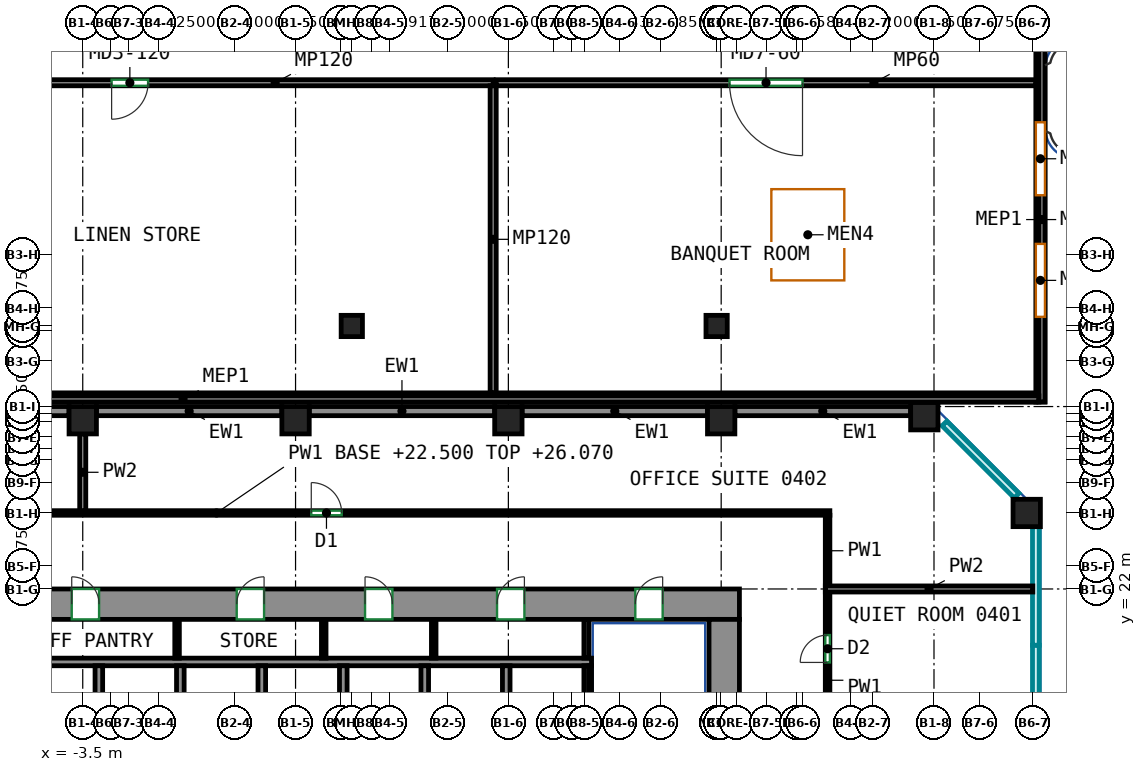
"""IFC4 building model, lengths in metres.
Left out: names, types, materials, properties, quantities, classifications, styles, units other than length and angle.
Written with IfcOpenShell. Run it as: python <this file> out.ifc"""

import sys

from ifc_helpers import new_model, si_unit, direction, frame, frame_2d, origin, origin_2d, place, context, subcontext, project, spatial, rectangle, extrude, source, transform, mapped, element, fill, save


model = new_model("IFC4")
c1 = context("Model", 3, precision=1e-05, world=origin(), true_north=direction((0.0, 1.0)))
c2 = subcontext(c1, "Body", "Model", "MODEL_VIEW")
j1 = project(units=[si_unit("LENGTHUNIT", "METRE"), si_unit("PLANEANGLEUNIT", "RADIAN")], contexts=[c1])
p1 = place(None, origin())
s1 = spatial("IfcSite", under=j1, at=p1, CompositionType="ELEMENT")
p2 = place(p1, origin())
s2 = spatial("IfcBuilding", under=s1, at=p2, CompositionType="ELEMENT")
p3 = place(p2, frame((0.0, 0.0, 22.5)))
s3 = spatial("IfcBuildingStorey", under=s2, at=p3, CompositionType="ELEMENT", Elevation=22.5)
m1 = source(origin(), c2, "Body", "SweptSolid", [
    extrude(rectangle(XDim=0.9, YDim=0.9, at=origin_2d()), origin(), (0.0, 0.0, 1.0), 4.22),
])
for number, where, z_axis, x_axis in (
    (1, (-3.5, 27.55, 0.0), (0.0, 0.0, 1.0), (1.0, 0.0, 0.0)),
    (2, (3.5, 27.55, 0.0), (0.0, 0.0, 1.0), (1.0, 0.0, 0.0)),
    (3, (10.5, 27.55, 0.0), (0.0, 0.0, 1.0), (1.0, 0.0, 0.0)),
    (4, (17.5, 27.55, 0.0), (0.0, 0.0, 1.0), (1.0, 0.0, 0.0)),
    (5, (24.182, 27.682, 0.0), (0.0, 0.0, 1.0), (1.0, 0.0, 0.0)),
    (6, (27.55, 24.5, 0.0), (0.0, 0.0, 1.0), (1.0, 0.0, 0.0)),
):
    element("IfcColumn", number, at=place(p3, frame(where, z_axis=z_axis, x_axis=x_axis)), inside=s3, PredefinedType="COLUMN", context=c2, shape_type="MappedRepresentation", body=[
        mapped(m1, transform((0.0, 0.0, 0.0))),
    ])
m2 = source(origin(), c2, "Body", "SweptSolid", [
    extrude(rectangle(XDim=34.1, YDim=1.0, at=frame_2d((17.05, 0.0))), origin(), (0.0, 0.0, 1.0), 4.22),
])
p4 = place(p3, frame((-16.0, 21.5, 0.0), z_axis=(0.0, 0.0, 1.0), x_axis=(1.0, 0.0, 0.0)))
e7 = element("IfcWall", 7, at=p4, inside=s3, PredefinedType="SHEAR", context=c2, shape_type="MappedRepresentation", body=[
    mapped(m2, transform((0.0, 0.0, 0.0))),
])
p5 = place(p4, frame((6.831, 0.0, 0.0)))
e8 = element("IfcOpeningElement", 8, at=p5, cuts=e7, PredefinedType="OPENING", context=c2, shape_type="SweptSolid", body=[
    extrude(rectangle(XDim=0.9, YDim=2.1, at=frame_2d((0.45, 1.05))), frame((0.0, 0.51, 0.0), z_axis=(0.0, -1.0, 0.0), x_axis=(1.0, 0.0, 0.0)), (0.0, 0.0, 1.0), 1.02),
])
p6 = place(p4, frame((12.138, 0.0, 0.0)))
e9 = element("IfcOpeningElement", 9, at=p6, cuts=e7, PredefinedType="OPENING", context=c2, shape_type="SweptSolid", body=[
    extrude(rectangle(XDim=0.9, YDim=2.1, at=frame_2d((0.45, 1.05))), frame((0.0, 0.51, 0.0), z_axis=(0.0, -1.0, 0.0), x_axis=(1.0, 0.0, 0.0)), (0.0, 0.0, 1.0), 1.02),
])
p7 = place(p4, frame((17.565, 0.0, 0.0)))
e10 = element("IfcOpeningElement", 10, at=p7, cuts=e7, PredefinedType="OPENING", context=c2, shape_type="SweptSolid", body=[
    extrude(rectangle(XDim=0.9, YDim=2.1, at=frame_2d((0.45, 1.05))), frame((0.0, 0.51, 0.0), z_axis=(0.0, -1.0, 0.0), x_axis=(1.0, 0.0, 0.0)), (0.0, 0.0, 1.0), 1.02),
])
p8 = place(p4, frame((21.786, 0.0, 0.0)))
e11 = element("IfcOpeningElement", 11, at=p8, cuts=e7, PredefinedType="OPENING", context=c2, shape_type="SweptSolid", body=[
    extrude(rectangle(XDim=0.9, YDim=2.1, at=frame_2d((0.45, 1.05))), frame((0.0, 0.51, 0.0), z_axis=(0.0, -1.0, 0.0), x_axis=(1.0, 0.0, 0.0)), (0.0, 0.0, 1.0), 1.02),
])
p9 = place(p4, frame((26.127, 0.0, 0.0)))
e12 = element("IfcOpeningElement", 12, at=p9, cuts=e7, PredefinedType="OPENING", context=c2, shape_type="SweptSolid", body=[
    extrude(rectangle(XDim=0.9, YDim=2.1, at=frame_2d((0.45, 1.05))), frame((0.0, 0.51, 0.0), z_axis=(0.0, -1.0, 0.0), x_axis=(1.0, 0.0, 0.0)), (0.0, 0.0, 1.0), 1.02),
])
p10 = place(p4, frame((2.525, 0.0, 0.0)))
e13 = element("IfcOpeningElement", 13, at=p10, cuts=e7, PredefinedType="OPENING", context=c2, shape_type="SweptSolid", body=[
    extrude(rectangle(XDim=0.9, YDim=2.1, at=frame_2d((0.45, 1.05))), frame((0.0, 0.51, 0.0), z_axis=(0.0, -1.0, 0.0), x_axis=(1.0, 0.0, 0.0)), (0.0, 0.0, 1.0), 1.02),
])
p11 = place(p4, frame((30.675, 0.0, 0.0)))
e14 = element("IfcOpeningElement", 14, at=p11, cuts=e7, PredefinedType="OPENING", context=c2, shape_type="SweptSolid", body=[
    extrude(rectangle(XDim=0.9, YDim=2.1, at=frame_2d((0.45, 1.05))), frame((0.0, 0.51, 0.0), z_axis=(0.0, -1.0, 0.0), x_axis=(1.0, 0.0, 0.0)), (0.0, 0.0, 1.0), 1.02),
])
m3 = source(origin(), c2, "Body", "SweptSolid", [
    extrude(rectangle(XDim=12.0, YDim=1.0, at=frame_2d((6.0, 0.0))), origin(), (0.0, 0.0, 1.0), 4.22),
])
p12 = place(p3, frame((17.6, 9.0, 0.0), z_axis=(0.0, 0.0, 1.0), x_axis=(0.0, 1.0, 0.0)))
e15 = element("IfcWall", 15, at=p12, inside=s3, PredefinedType="SHEAR", context=c2, shape_type="MappedRepresentation", body=[
    mapped(m3, transform((0.0, 0.0, 0.0))),
])
m4 = source(origin(), c2, "Body", "SweptSolid", [
    extrude(rectangle(XDim=0.7, YDim=0.7, at=origin_2d()), origin(), (0.0, 0.0, 1.0), 4.22),
])
for number, where, z_axis, x_axis in (
    (16, (5.35, 30.65, 0.0), (0.0, 0.0, 1.0), (1.0, 0.0, 0.0)),
    (17, (17.35, 30.65, 0.0), (0.0, 0.0, 1.0), (1.0, 0.0, 0.0)),
):
    element("IfcColumn", number, at=place(p3, frame(where, z_axis=z_axis, x_axis=x_axis)), inside=s3, PredefinedType="COLUMN", context=c2, shape_type="MappedRepresentation", body=[
        mapped(m4, transform((0.0, 0.0, 0.0))),
    ])
m5 = source(origin(), c2, "Body", "SweptSolid", [
    extrude(rectangle(XDim=5.782, YDim=0.3, at=frame_2d((2.891, 0.0))), origin(), (0.0, 0.0, 1.0), 4.22),
])
p13 = place(p3, frame((23.732, 27.85, 0.0), z_axis=(0.0, 0.0, 1.0), x_axis=(-1.0, 0.0, 0.0)))
e18 = element("IfcWall", 18, at=p13, inside=s3, PredefinedType="SOLIDWALL", context=c2, shape_type="MappedRepresentation", body=[
    mapped(m5, transform((0.0, 0.0, 0.0))),
])
m6 = source(origin(), c2, "Body", "SweptSolid", [
    extrude(rectangle(XDim=6.1, YDim=0.3, at=frame_2d((3.05, 0.0))), origin(), (0.0, 0.0, 1.0), 4.22),
])
for number, where, z_axis, x_axis in (
    (19, (17.05, 27.85, 0.0), (0.0, 0.0, 1.0), (-1.0, 0.0, 0.0)),
    (20, (10.05, 27.85, 0.0), (0.0, 0.0, 1.0), (-1.0, 0.0, 0.0)),
    (21, (3.05, 27.85, 0.0), (0.0, 0.0, 1.0), (-1.0, 0.0, 0.0)),
    (22, (-3.95, 27.85, 0.0), (0.0, 0.0, 1.0), (-1.0, 0.0, 0.0)),
):
    element("IfcWall", number, at=place(p3, frame(where, z_axis=z_axis, x_axis=x_axis)), inside=s3, PredefinedType="SOLIDWALL", context=c2, shape_type="MappedRepresentation", body=[
        mapped(m6, transform((0.0, 0.0, 0.0))),
    ])
m7 = source(origin(), c2, "Body", "SweptSolid", [
    extrude(rectangle(XDim=12.0, YDim=0.3, at=frame_2d((6.0, 0.0))), origin(), (0.0, 0.0, 1.0), 4.22),
])
p14 = place(p3, frame((28.0, 40.15, 0.0), z_axis=(0.0, 0.0, 1.0), x_axis=(0.0, -1.0, 0.0)))
e23 = element("IfcWall", 23, at=p14, inside=s3, PredefinedType="SOLIDWALL", context=c2, shape_type="MappedRepresentation", body=[
    mapped(m7, transform((0.0, 0.0, 0.0))),
])
p15 = place(p14, frame((2.8, 0.0, 0.9)))
e24 = element("IfcOpeningElement", 24, at=p15, cuts=e23, PredefinedType="OPENING", context=c2, shape_type="SweptSolid", body=[
    extrude(rectangle(XDim=2.4, YDim=1.8, at=frame_2d((1.2, 0.9))), frame((0.0, 0.16, 0.0), z_axis=(0.0, -1.0, 0.0), x_axis=(1.0, 0.0, 0.0)), (0.0, 0.0, 1.0), 0.32),
])
p16 = place(p14, frame((6.8, 0.0, 0.9)))
e25 = element("IfcOpeningElement", 25, at=p16, cuts=e23, PredefinedType="OPENING", context=c2, shape_type="SweptSolid", body=[
    extrude(rectangle(XDim=2.4, YDim=1.8, at=frame_2d((1.2, 0.9))), frame((0.0, 0.16, 0.0), z_axis=(0.0, -1.0, 0.0), x_axis=(1.0, 0.0, 0.0)), (0.0, 0.0, 1.0), 0.32),
])
m8 = source(origin(), c2, "Body", "SweptSolid", [
    extrude(rectangle(XDim=56.3, YDim=0.3, at=frame_2d((28.15, 0.0))), origin(), (0.0, 0.0, 1.0), 4.22),
])
p17 = place(p3, frame((27.85, 28.3, 0.0), z_axis=(0.0, 0.0, 1.0), x_axis=(-1.0, 0.0, 0.0)))
e26 = element("IfcWall", 26, at=p17, inside=s3, PredefinedType="SOLIDWALL", context=c2, shape_type="MappedRepresentation", body=[
    mapped(m8, transform((0.0, 0.0, 0.0))),
])
m9 = source(origin(), c2, "Body", "SweptSolid", [
    extrude(rectangle(XDim=12.0, YDim=0.2, at=frame_2d((6.0, 0.0))), origin(), (0.0, 0.0, 1.0), 1.1),
])
p18 = place(p3, frame((28.05, 40.15, 4.5), z_axis=(0.0, 0.0, 1.0), x_axis=(0.0, -1.0, 0.0)))
e27 = element("IfcWall", 27, at=p18, inside=s3, PredefinedType="PARAPET", context=c2, shape_type="MappedRepresentation", body=[
    mapped(m9, transform((0.0, 0.0, 0.0))),
])
m10 = source(origin(), c2, "Body", "SweptSolid", [
    extrude(rectangle(XDim=56.3, YDim=0.2, at=frame_2d((28.15, 0.0))), origin(), (0.0, 0.0, 1.0), 1.1),
])
p19 = place(p3, frame((27.95, 28.25, 4.5), z_axis=(0.0, 0.0, 1.0), x_axis=(-1.0, 0.0, 0.0)))
e28 = element("IfcWall", 28, at=p19, inside=s3, PredefinedType="PARAPET", context=c2, shape_type="MappedRepresentation", body=[
    mapped(m10, transform((0.0, 0.0, 0.0))),
])
m11 = source(origin(), c2, "Body", "SweptSolid", [
    extrude(rectangle(XDim=24.37, YDim=0.25, at=frame_2d((12.185, 0.0))), origin(), (0.0, 0.0, 1.0), 4.22),
])
p20 = place(p3, frame((-11.135, 19.6, 0.0), z_axis=(0.0, 0.0, 1.0), x_axis=(1.0, 0.0, 0.0)))
e29 = element("IfcWall", 29, at=p20, inside=s3, PredefinedType="PARTITIONING", context=c2, shape_type="MappedRepresentation", body=[
    mapped(m11, transform((0.0, 0.0, 0.0))),
])
m12 = source(origin(), c2, "Body", "SweptSolid", [
    extrude(rectangle(XDim=3.275, YDim=0.165, at=frame_2d((1.638, 0.0))), origin(), (0.0, 0.0, 1.0), 4.22),
])
p21 = place(p3, frame((13.067, 16.2, 0.0), z_axis=(0.0, 0.0, 1.0), x_axis=(0.0, 1.0, 0.0)))
e30 = element("IfcWall", 30, at=p21, inside=s3, PredefinedType="PARTITIONING", context=c2, shape_type="MappedRepresentation", body=[
    mapped(m12, transform((0.0, 0.0, 0.0))),
])
m13 = source(origin(), c2, "Body", "SweptSolid", [
    extrude(rectangle(XDim=1.275, YDim=0.165, at=frame_2d((0.637, 0.0))), origin(), (0.0, 0.0, 1.0), 4.22),
])
p22 = place(p3, frame((13.067, 19.725, 0.0), z_axis=(0.0, 0.0, 1.0), x_axis=(0.0, 1.0, 0.0)))
e31 = element("IfcWall", 31, at=p22, inside=s3, PredefinedType="PARTITIONING", context=c2, shape_type="MappedRepresentation", body=[
    mapped(m13, transform((0.0, 0.0, 0.0))),
])
m14 = source(origin(), c2, "Body", "SweptSolid", [
    extrude(rectangle(XDim=3.275, YDim=0.25, at=frame_2d((1.638, 0.0))), origin(), (0.0, 0.0, 1.0), 4.22),
])
p23 = place(p3, frame((10.43, 16.2, 0.0), z_axis=(0.0, 0.0, 1.0), x_axis=(0.0, 1.0, 0.0)))
e32 = element("IfcWall", 32, at=p23, inside=s3, PredefinedType="PARTITIONING", context=c2, shape_type="MappedRepresentation", body=[
    mapped(m14, transform((0.0, 0.0, 0.0))),
])
m15 = source(origin(), c2, "Body", "SweptSolid", [
    extrude(rectangle(XDim=2.725, YDim=0.085, at=frame_2d((1.363, 0.0))), origin(), (0.0, 0.0, 1.0), 4.22),
])
p24 = place(p3, frame((13.192, 16.75, 0.0), z_axis=(0.0, 0.0, 1.0), x_axis=(0.0, 1.0, 0.0)))
e33 = element("IfcWall", 33, at=p24, inside=s3, PredefinedType="PARTITIONING", context=c2, shape_type="MappedRepresentation", body=[
    mapped(m15, transform((0.0, 0.0, 0.0))),
])
for number, where, z_axis, x_axis in (
    (34, (2.39, 16.2, 0.0), (0.0, 0.0, 1.0), (0.0, 1.0, 0.0)),
    (35, (5.07, 16.2, 0.0), (0.0, 0.0, 1.0), (0.0, 1.0, 0.0)),
    (36, (7.75, 16.2, 0.0), (0.0, 0.0, 1.0), (0.0, 1.0, 0.0)),
    (37, (-0.29, 16.2, 0.0), (0.0, 0.0, 1.0), (0.0, 1.0, 0.0)),
    (38, (-2.97, 16.2, 0.0), (0.0, 0.0, 1.0), (0.0, 1.0, 0.0)),
):
    element("IfcWall", number, at=place(p3, frame(where, z_axis=z_axis, x_axis=x_axis)), inside=s3, PredefinedType="PARTITIONING", context=c2, shape_type="MappedRepresentation", body=[
        mapped(m14, transform((0.0, 0.0, 0.0))),
    ])
m16 = source(origin(), c2, "Body", "SweptSolid", [
    extrude(rectangle(XDim=1.275, YDim=0.15, at=frame_2d((0.637, 0.0))), origin(), (0.0, 0.0, 1.0), 4.22),
])
for number, where, z_axis, x_axis in (
    (39, (-0.397, 19.725, 0.0), (0.0, 0.0, 1.0), (0.0, 1.0, 0.0)),
    (40, (4.427, 19.725, 0.0), (0.0, 0.0, 1.0), (0.0, 1.0, 0.0)),
    (41, (8.045, 19.725, 0.0), (0.0, 0.0, 1.0), (0.0, 1.0, 0.0)),
):
    element("IfcWall", number, at=place(p3, frame(where, z_axis=z_axis, x_axis=x_axis)), inside=s3, PredefinedType="PARTITIONING", context=c2, shape_type="MappedRepresentation", body=[
        mapped(m16, transform((0.0, 0.0, 0.0))),
    ])
p25 = place(p3, frame((21.0, 17.75, 0.0), z_axis=(0.0, 0.0, 1.0), x_axis=(0.0, 1.0, 0.0)))
e42 = element("IfcWall", 42, at=p25, inside=s3, PredefinedType="PARTITIONING", context=c2, shape_type="SweptSolid", body=[
    extrude(rectangle(XDim=4.16, YDim=0.15, at=frame_2d((2.08, 0.0))), origin(), (0.0, 0.0, 1.0), 4.22),
])
p26 = place(p25, frame((1.834, 0.0, 0.0)))
e43 = element("IfcOpeningElement", 43, at=p26, cuts=e42, PredefinedType="OPENING", context=c2, shape_type="SweptSolid", body=[
    extrude(rectangle(XDim=0.9, YDim=2.1, at=frame_2d((0.45, 1.05))), frame((0.0, 0.085, 0.0), z_axis=(0.0, -1.0, 0.0), x_axis=(1.0, 0.0, 0.0)), (0.0, 0.0, 1.0), 0.17),
])
p27 = place(p3, frame((21.0, 22.09, 0.0), z_axis=(0.0, 0.0, 1.0), x_axis=(0.0, 1.0, 0.0)))
e44 = element("IfcWall", 44, at=p27, inside=s3, PredefinedType="PARTITIONING", context=c2, shape_type="SweptSolid", body=[
    extrude(rectangle(XDim=2.335, YDim=0.15, at=frame_2d((1.167, 0.0))), origin(), (0.0, 0.0, 1.0), 4.22),
])
p28 = place(p3, frame((-19.275, 24.5, 0.0), z_axis=(0.0, 0.0, 1.0), x_axis=(1.0, 0.0, 0.0)))
e45 = element("IfcWall", 45, at=p28, inside=s3, PredefinedType="PARTITIONING", context=c2, shape_type="SweptSolid", body=[
    extrude(rectangle(XDim=40.35, YDim=0.15, at=frame_2d((20.175, 0.0))), origin(), (0.0, 0.0, 1.0), 3.57),
])
p29 = place(p28, frame((10.378, 0.0, 0.0)))
e46 = element("IfcOpeningElement", 46, at=p29, cuts=e45, PredefinedType="OPENING", context=c2, shape_type="SweptSolid", body=[
    extrude(rectangle(XDim=0.9, YDim=2.1, at=frame_2d((0.45, 1.05))), frame((0.0, 0.085, 0.0), z_axis=(0.0, -1.0, 0.0), x_axis=(1.0, 0.0, 0.0)), (0.0, 0.0, 1.0), 0.17),
])
p30 = place(p28, frame((23.292, 0.0, 0.0)))
e47 = element("IfcOpeningElement", 47, at=p30, cuts=e45, PredefinedType="OPENING", context=c2, shape_type="SweptSolid", body=[
    extrude(rectangle(XDim=1.0, YDim=2.1, at=frame_2d((0.5, 1.05))), frame((0.0, 0.085, 0.0), z_axis=(0.0, -1.0, 0.0), x_axis=(1.0, 0.0, 0.0)), (0.0, 0.0, 1.0), 0.17),
])
p31 = place(p3, frame((20.926, 22.0, 0.0), z_axis=(0.0, 0.0, 1.0), x_axis=(1.0, 0.0, 0.0)))
e48 = element("IfcWall", 48, at=p31, inside=s3, PredefinedType="PARTITIONING", context=c2, shape_type="SweptSolid", body=[
    extrude(rectangle(XDim=6.824, YDim=0.2, at=frame_2d((3.412, 0.0))), origin(), (0.0, 0.0, 1.0), 4.22),
])
p32 = place(p3, frame((-3.5, 27.1, 0.0), z_axis=(0.0, 0.0, 1.0), x_axis=(0.0, -1.0, 0.0)))
e49 = element("IfcWall", 49, at=p32, inside=s3, PredefinedType="PARTITIONING", context=c2, shape_type="SweptSolid", body=[
    extrude(rectangle(XDim=2.524, YDim=0.2, at=frame_2d((1.262, 0.0))), origin(), (0.0, 0.0, 1.0), 4.22),
])
m17 = source(origin(), c2, "Body", "SweptSolid", [
    extrude(rectangle(XDim=23.9, YDim=0.2, at=frame_2d((11.95, 0.0))), origin(), (0.0, 0.0, 1.0), 3.42),
])
p33 = place(p3, frame((10.0, 38.65, 0.0), z_axis=(0.0, 0.0, 1.0), x_axis=(-1.0, 0.0, 0.0)))
e50 = element("IfcWall", 50, at=p33, inside=s3, PredefinedType="PARTITIONING", context=c2, shape_type="MappedRepresentation", body=[
    mapped(m17, transform((0.0, 0.0, 0.0))),
])
p34 = place(p33, frame((11.35, 0.0, 0.0)))
e51 = element("IfcOpeningElement", 51, at=p34, cuts=e50, PredefinedType="OPENING", context=c2, shape_type="SweptSolid", body=[
    extrude(rectangle(XDim=1.2, YDim=2.1, at=frame_2d((0.6, 1.05))), frame((0.0, 0.11, 0.0), z_axis=(0.0, -1.0, 0.0), x_axis=(1.0, 0.0, 0.0)), (0.0, 0.0, 1.0), 0.22),
])
m18 = source(origin(), c2, "Body", "SweptSolid", [
    extrude(rectangle(XDim=10.1, YDim=0.2, at=frame_2d((5.05, 0.0))), origin(), (0.0, 0.0, 1.0), 3.42),
])
p35 = place(p3, frame((10.0, 38.55, 0.0), z_axis=(0.0, 0.0, 1.0), x_axis=(0.0, -1.0, 0.0)))
e52 = element("IfcWall", 52, at=p35, inside=s3, PredefinedType="PARTITIONING", context=c2, shape_type="MappedRepresentation", body=[
    mapped(m18, transform((0.0, 0.0, 0.0))),
])
m19 = source(origin(), c2, "Body", "SweptSolid", [
    extrude(rectangle(XDim=17.75, YDim=0.2, at=frame_2d((8.875, 0.0))), origin(), (0.0, 0.0, 1.0), 3.42),
])
p36 = place(p3, frame((27.85, 38.65, 0.0), z_axis=(0.0, 0.0, 1.0), x_axis=(-1.0, 0.0, 0.0)))
e53 = element("IfcWall", 53, at=p36, inside=s3, PredefinedType="PARTITIONING", context=c2, shape_type="MappedRepresentation", body=[
    mapped(m19, transform((0.0, 0.0, 0.0))),
])
p37 = place(p36, frame((7.675, 0.0, 0.0)))
e54 = element("IfcOpeningElement", 54, at=p37, cuts=e53, PredefinedType="OPENING", context=c2, shape_type="SweptSolid", body=[
    extrude(rectangle(XDim=2.4, YDim=2.4, at=frame_2d((1.2, 1.2))), frame((0.0, 0.11, 0.0), z_axis=(0.0, -1.0, 0.0), x_axis=(1.0, 0.0, 0.0)), (0.0, 0.0, 1.0), 0.22),
])
p38 = place(p15, origin())
e55 = element("IfcWindow", 55, at=p38, inside=s3, PartitioningType="SINGLE_PANEL", PredefinedType="WINDOW", context=c2, shape_type="SweptSolid", body=[
    extrude(rectangle(XDim=2.4, YDim=1.8, at=frame_2d((1.2, 0.9))), frame((0.0, 0.03, 0.0), z_axis=(0.0, -1.0, 0.0), x_axis=(1.0, 0.0, 0.0)), (0.0, 0.0, 1.0), 0.06),
])
fill(e24, e55)
p39 = place(p16, origin())
e56 = element("IfcWindow", 56, at=p39, inside=s3, PartitioningType="SINGLE_PANEL", PredefinedType="WINDOW", context=c2, shape_type="SweptSolid", body=[
    extrude(rectangle(XDim=2.4, YDim=1.8, at=frame_2d((1.2, 0.9))), frame((0.0, 0.03, 0.0), z_axis=(0.0, -1.0, 0.0), x_axis=(1.0, 0.0, 0.0)), (0.0, 0.0, 1.0), 0.06),
])
fill(e25, e56)
p40 = place(p2, frame((0.0, 0.0, 27.0)))
p41 = place(p40, frame((0.0, 0.0, -0.28)))
p42 = place(p41, frame((20.35, 33.65, 0.0)))
p43 = place(p42, frame((0.0, 0.0, 0.23)))
e57 = element("IfcWindow", 57, at=p43, inside=s3, PartitioningType="SINGLE_PANEL", PredefinedType="SKYLIGHT", context=c2, shape_type="SweptSolid", body=[
    extrude(rectangle(XDim=2.4, YDim=3.0, at=origin_2d()), origin(), (0.0, 0.0, 1.0), 0.05),
])
p44 = place(p6, origin())
e58 = element("IfcDoor", 58, at=p44, inside=s3, OperationType="SINGLE_SWING_LEFT", PredefinedType="DOOR", context=c2, shape_type="SweptSolid", body=[
    extrude(rectangle(XDim=0.9, YDim=2.1, at=frame_2d((0.45, 1.05))), frame((0.0, -0.355, 0.0), z_axis=(0.0, -1.0, 0.0), x_axis=(1.0, 0.0, 0.0)), (0.0, 0.0, 1.0), 0.05),
])
fill(e9, e58)
p45 = place(p7, origin())
e59 = element("IfcDoor", 59, at=p45, inside=s3, OperationType="SINGLE_SWING_RIGHT", PredefinedType="DOOR", context=c2, shape_type="SweptSolid", body=[
    extrude(rectangle(XDim=0.9, YDim=2.1, at=frame_2d((0.45, 1.05))), frame((0.0, -0.355, 0.0), z_axis=(0.0, -1.0, 0.0), x_axis=(1.0, 0.0, 0.0)), (0.0, 0.0, 1.0), 0.05),
])
fill(e10, e59)
p46 = place(p8, origin())
e60 = element("IfcDoor", 60, at=p46, inside=s3, OperationType="SINGLE_SWING_LEFT", PredefinedType="DOOR", context=c2, shape_type="SweptSolid", body=[
    extrude(rectangle(XDim=0.9, YDim=2.1, at=frame_2d((0.45, 1.05))), frame((0.0, -0.355, 0.0), z_axis=(0.0, -1.0, 0.0), x_axis=(1.0, 0.0, 0.0)), (0.0, 0.0, 1.0), 0.05),
])
fill(e11, e60)
p47 = place(p9, origin())
e61 = element("IfcDoor", 61, at=p47, inside=s3, OperationType="SINGLE_SWING_RIGHT", PredefinedType="DOOR", context=c2, shape_type="SweptSolid", body=[
    extrude(rectangle(XDim=0.9, YDim=2.1, at=frame_2d((0.45, 1.05))), frame((0.0, -0.355, 0.0), z_axis=(0.0, -1.0, 0.0), x_axis=(1.0, 0.0, 0.0)), (0.0, 0.0, 1.0), 0.05),
])
fill(e12, e61)
p48 = place(p11, origin())
e62 = element("IfcDoor", 62, at=p48, inside=s3, OperationType="SINGLE_SWING_RIGHT", PredefinedType="DOOR", context=c2, shape_type="SweptSolid", body=[
    extrude(rectangle(XDim=0.9, YDim=2.1, at=frame_2d((0.45, 1.05))), frame((0.0, -0.355, 0.0), z_axis=(0.0, -1.0, 0.0), x_axis=(1.0, 0.0, 0.0)), (0.0, 0.0, 1.0), 0.05),
])
fill(e14, e62)
p49 = place(p26, origin())
e63 = element("IfcDoor", 63, at=p49, inside=s3, OperationType="SINGLE_SWING_LEFT", PredefinedType="DOOR", context=c2, shape_type="SweptSolid", body=[
    extrude(rectangle(XDim=0.9, YDim=2.1, at=frame_2d((0.45, 1.05))), frame((0.0, 0.025, 0.0), z_axis=(0.0, -1.0, 0.0), x_axis=(1.0, 0.0, 0.0)), (0.0, 0.0, 1.0), 0.05),
])
fill(e43, e63)
p50 = place(p30, origin())
e64 = element("IfcDoor", 64, at=p50, inside=s3, OperationType="SINGLE_SWING_LEFT", PredefinedType="DOOR", context=c2, shape_type="SweptSolid", body=[
    extrude(rectangle(XDim=1.0, YDim=2.1, at=frame_2d((0.5, 1.05))), frame((0.0, 0.025, 0.0), z_axis=(0.0, -1.0, 0.0), x_axis=(1.0, 0.0, 0.0)), (0.0, 0.0, 1.0), 0.05),
])
fill(e47, e64)
p51 = place(p34, origin())
e65 = element("IfcDoor", 65, at=p51, inside=s3, OperationType="SINGLE_SWING_RIGHT", PredefinedType="DOOR", context=c2, shape_type="SweptSolid", body=[
    extrude(rectangle(XDim=1.2, YDim=2.1, at=frame_2d((0.6, 1.05))), frame((0.0, 0.025, 0.0), z_axis=(0.0, -1.0, 0.0), x_axis=(1.0, 0.0, 0.0)), (0.0, 0.0, 1.0), 0.05),
])
fill(e51, e65)
p52 = place(p37, origin())
e66 = element("IfcDoor", 66, at=p52, inside=s3, OperationType="DOUBLE_DOOR_SINGLE_SWING", PredefinedType="DOOR", context=c2, shape_type="SweptSolid", body=[
    extrude(rectangle(XDim=2.4, YDim=2.4, at=frame_2d((1.2, 1.2))), frame((0.0, 0.025, 0.0), z_axis=(0.0, -1.0, 0.0), x_axis=(1.0, 0.0, 0.0)), (0.0, 0.0, 1.0), 0.05),
])
fill(e54, e66)
save(model, sys.argv[1])
